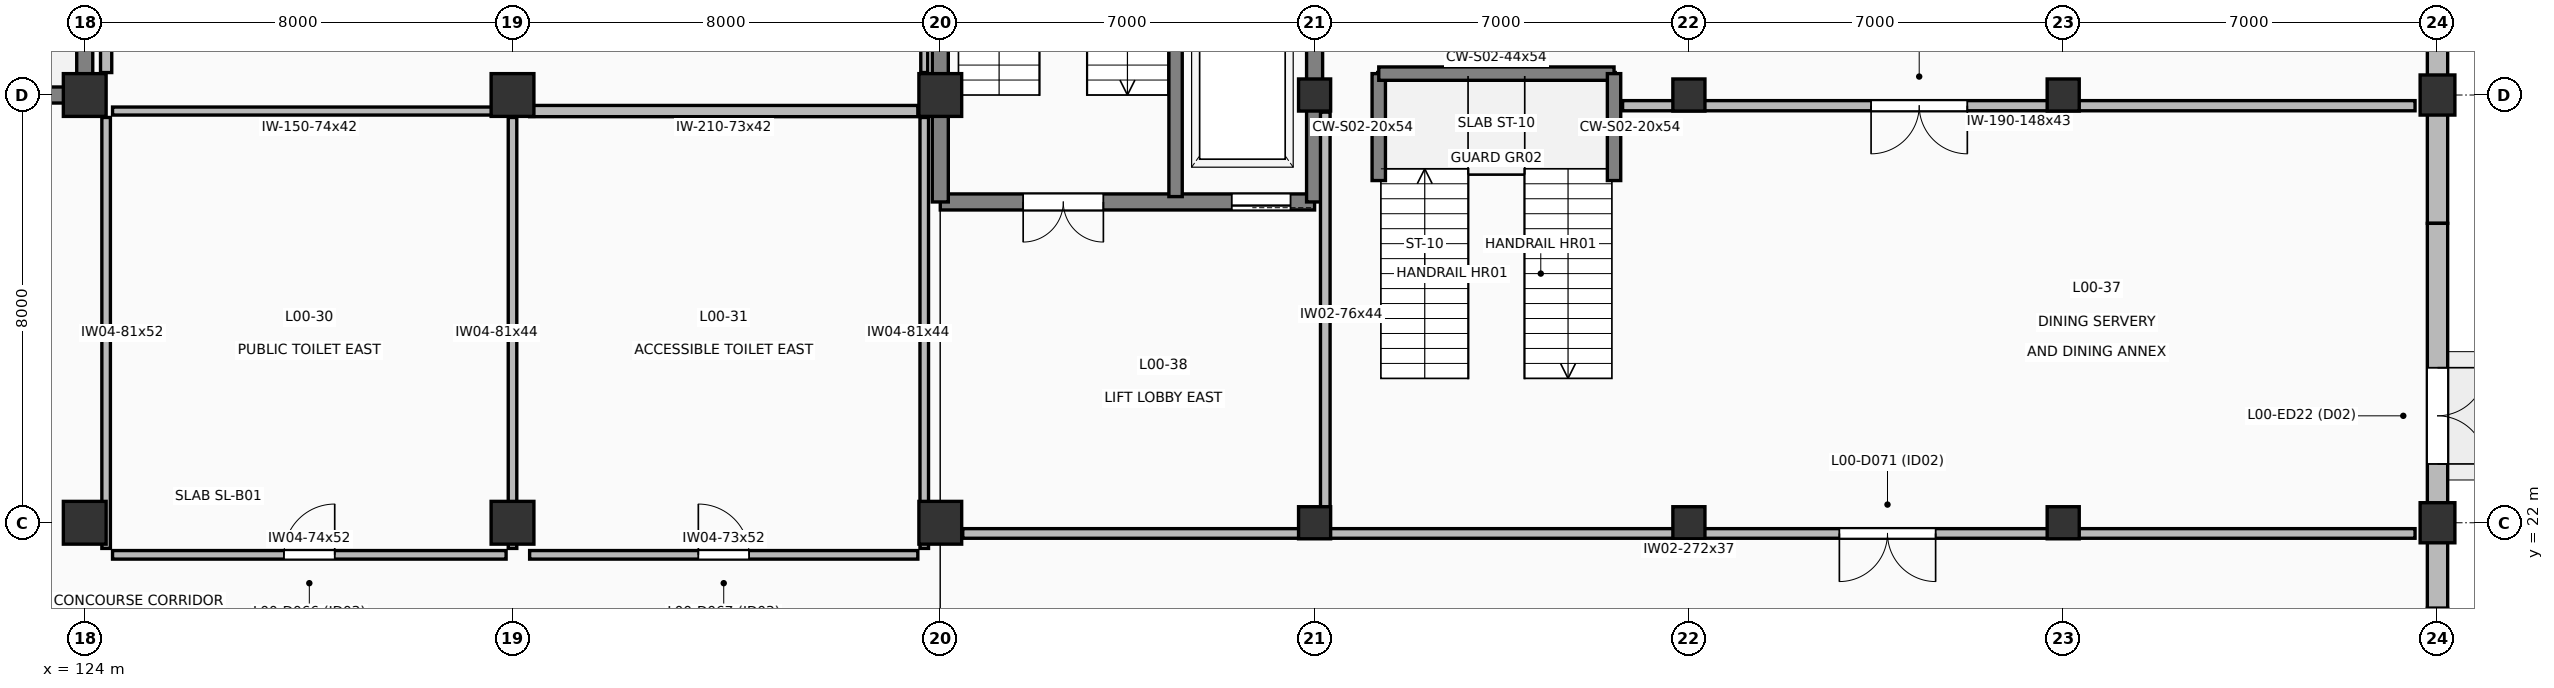
"""IFC4 building model, lengths in metres.
Left out: names, types, materials, properties, quantities, classifications, styles, units other than length and angle.
Written with IfcOpenShell. Run it as: python <this file> out.ifc"""

import sys

from ifc_helpers import new_model, si_unit, direction, frame, frame_2d, origin, origin_2d, place, context, subcontext, project, spatial, rectangle, extrude, element, fill, save


model = new_model("IFC4")
c1 = context("Model", 3, precision=1e-05, world=origin(), true_north=direction((0.0, 1.0)))
c2 = subcontext(c1, "Body", "Model", "MODEL_VIEW")
j1 = project(units=[si_unit("LENGTHUNIT", "METRE"), si_unit("PLANEANGLEUNIT", "RADIAN")], contexts=[c1])
p1 = place(None, origin())
s1 = spatial("IfcSite", under=j1, at=p1, CompositionType="ELEMENT")
p2 = place(p1, origin())
s2 = spatial("IfcBuilding", under=s1, at=p2, CompositionType="ELEMENT")
p3 = place(p2, origin())
s3 = spatial("IfcBuildingStorey", under=s2, at=p3, CompositionType="ELEMENT", Elevation=0.0)
for number, where, z_axis, x_axis in (
    (1, (124.0, 22.0, 0.0), (0.0, 0.0, 1.0), (1.0, 0.0, 0.0)),
    (2, (124.0, 30.0, 0.0), (0.0, 0.0, 1.0), (1.0, 0.0, 0.0)),
    (3, (132.0, 22.0, 0.0), (0.0, 0.0, 1.0), (1.0, 0.0, 0.0)),
    (4, (132.0, 30.0, 0.0), (0.0, 0.0, 1.0), (1.0, 0.0, 0.0)),
    (5, (140.0, 22.0, 0.0), (0.0, 0.0, 1.0), (1.0, 0.0, 0.0)),
    (6, (140.0, 30.0, 0.0), (0.0, 0.0, 1.0), (1.0, 0.0, 0.0)),
):
    element("IfcColumn", number, at=place(p3, frame(where, z_axis=z_axis, x_axis=x_axis)), inside=s3, PredefinedType="COLUMN", context=c2, shape_type="SweptSolid", body=[
        extrude(rectangle(XDim=0.8, YDim=0.8, at=origin_2d()), origin(), (0.0, 0.0, 1.0), 5.4),
    ])
for number, where, z_axis, x_axis in (
    (7, (147.0, 22.0, 0.0), (0.0, 0.0, 1.0), (1.0, 0.0, 0.0)),
    (8, (147.0, 30.0, 0.0), (0.0, 0.0, 1.0), (1.0, 0.0, 0.0)),
    (9, (154.0, 22.0, 0.0), (0.0, 0.0, 1.0), (1.0, 0.0, 0.0)),
    (10, (154.0, 30.0, 0.0), (0.0, 0.0, 1.0), (1.0, 0.0, 0.0)),
    (11, (161.0, 22.0, 0.0), (0.0, 0.0, 1.0), (1.0, 0.0, 0.0)),
    (12, (161.0, 30.0, 0.0), (0.0, 0.0, 1.0), (1.0, 0.0, 0.0)),
):
    element("IfcColumn", number, at=place(p3, frame(where, z_axis=z_axis, x_axis=x_axis)), inside=s3, PredefinedType="COLUMN", context=c2, shape_type="SweptSolid", body=[
        extrude(rectangle(XDim=0.6, YDim=0.6, at=origin_2d()), origin(), (0.0, 0.0, 1.0), 5.4),
    ])
for number, where, z_axis, x_axis in (
    (13, (168.0, 22.0, 0.0), (0.0, 0.0, 1.0), (1.0, 0.0, 0.0)),
    (14, (168.0, 30.0, 0.0), (0.0, 0.0, 1.0), (1.0, 0.0, 0.0)),
):
    element("IfcColumn", number, at=place(p3, frame(where, z_axis=z_axis, x_axis=x_axis)), inside=s3, PredefinedType="PILASTER", context=c2, shape_type="SweptSolid", body=[
        extrude(rectangle(XDim=0.65, YDim=0.75, at=origin_2d()), origin(), (0.0, 0.0, 1.0), 5.4),
    ])
p4 = place(p3, frame((168.0, 34.8, 0.0), z_axis=(0.0, 0.0, 1.0), x_axis=(0.0, -1.0, 0.0)))
e15 = element("IfcWall", 15, at=p4, inside=s3, PredefinedType="SOLIDWALL", context=c2, shape_type="SweptSolid", body=[
    extrude(rectangle(XDim=7.2, YDim=0.38, at=frame_2d((3.6, 0.0))), origin(), (0.0, 0.0, 1.0), 4.425),
])
p5 = place(p3, frame((168.0, 27.6, 0.0), z_axis=(0.0, 0.0, 1.0), x_axis=(0.0, -1.0, 0.0)))
e16 = element("IfcWall", 16, at=p5, inside=s3, PredefinedType="SOLIDWALL", context=c2, shape_type="SweptSolid", body=[
    extrude(rectangle(XDim=7.2, YDim=0.38, at=frame_2d((3.6, 0.0))), origin(), (0.0, 0.0, 1.0), 4.445),
])
p6 = place(p5, frame((2.7, 0.0, 0.0)))
e17 = element("IfcOpeningElement", 17, at=p6, cuts=e16, PredefinedType="OPENING", context=c2, shape_type="SweptSolid", body=[
    extrude(rectangle(XDim=1.8, YDim=2.3, at=frame_2d((0.9, 1.15))), frame((0.0, 0.2, 0.0), z_axis=(0.0, -1.0, 0.0), x_axis=(1.0, 0.0, 0.0)), (0.0, 0.0, 1.0), 0.4),
])
p7 = place(p3, frame((124.0, 30.0, 0.0), z_axis=(0.0, 0.0, 1.0), x_axis=(-1.0, 0.0, 0.0)))
e18 = element("IfcWall", 18, at=p7, inside=s3, PredefinedType="SHEAR", context=c2, shape_type="SweptSolid", body=[
    extrude(rectangle(XDim=8.0, YDim=0.3, at=frame_2d((4.0, 0.0))), origin(), (0.0, 0.0, 1.0), 5.4),
])
p8 = place(p7, frame((6.05, 0.0, 0.0)))
e19 = element("IfcOpeningElement", 19, at=p8, cuts=e18, PredefinedType="OPENING", context=c2, shape_type="SweptSolid", body=[
    extrude(rectangle(XDim=1.5, YDim=2.2, at=frame_2d((0.75, 1.1))), frame((0.0, 0.16, 0.0), z_axis=(0.0, -1.0, 0.0), x_axis=(1.0, 0.0, 0.0)), (0.0, 0.0, 1.0), 0.32),
])
p9 = place(p3, frame((124.0, 36.0, 0.0), z_axis=(0.0, 0.0, 1.0), x_axis=(0.0, -1.0, 0.0)))
e20 = element("IfcWall", 20, at=p9, inside=s3, PredefinedType="SHEAR", context=c2, shape_type="SweptSolid", body=[
    extrude(rectangle(XDim=6.0, YDim=0.3, at=frame_2d((3.0, 0.0))), origin(), (0.0, 0.0, 1.0), 5.4),
])
p10 = place(p3, frame((147.0, 28.0, 0.0), z_axis=(0.0, 0.0, 1.0), x_axis=(-1.0, 0.0, 0.0)))
e21 = element("IfcWall", 21, at=p10, inside=s3, PredefinedType="SHEAR", context=c2, shape_type="SweptSolid", body=[
    extrude(rectangle(XDim=7.0, YDim=0.3, at=frame_2d((3.5, 0.0))), origin(), (0.0, 0.0, 1.0), 5.4),
])
p11 = place(p10, frame((3.95, 0.0, 0.0)))
e22 = element("IfcOpeningElement", 22, at=p11, cuts=e21, PredefinedType="OPENING", context=c2, shape_type="SweptSolid", body=[
    extrude(rectangle(XDim=1.5, YDim=2.2, at=frame_2d((0.75, 1.1))), frame((0.0, 0.16, 0.0), z_axis=(0.0, -1.0, 0.0), x_axis=(1.0, 0.0, 0.0)), (0.0, 0.0, 1.0), 0.32),
])
p12 = place(p10, frame((0.45, 0.0, 0.0)))
e23 = element("IfcOpeningElement", 23, at=p12, cuts=e21, PredefinedType="OPENING", context=c2, shape_type="SweptSolid", body=[
    extrude(rectangle(XDim=1.1, YDim=2.2, at=frame_2d((0.55, 1.1))), frame((0.0, 0.16, 0.0), z_axis=(0.0, -1.0, 0.0), x_axis=(1.0, 0.0, 0.0)), (0.0, 0.0, 1.0), 0.32),
])
for number, where, z_axis, x_axis in (
    (24, (140.0, 28.0, 0.0), (0.0, 0.0, 1.0), (0.0, 1.0, 0.0)),
    (25, (147.0, 36.0, 0.0), (0.0, 0.0, 1.0), (0.0, -1.0, 0.0)),
):
    element("IfcWall", number, at=place(p3, frame(where, z_axis=z_axis, x_axis=x_axis)), inside=s3, PredefinedType="SHEAR", context=c2, shape_type="SweptSolid", body=[
        extrude(rectangle(XDim=8.0, YDim=0.3, at=frame_2d((4.0, 0.0))), origin(), (0.0, 0.0, 1.0), 5.4),
    ])
p13 = place(p3, frame((144.4, 28.1, 0.0), z_axis=(0.0, 0.0, 1.0), x_axis=(0.0, 1.0, 0.0)))
e26 = element("IfcWall", 26, at=p13, inside=s3, PredefinedType="SHEAR", context=c2, shape_type="SweptSolid", body=[
    extrude(rectangle(XDim=7.8, YDim=0.25, at=frame_2d((3.9, 0.0))), origin(), (0.0, 0.0, 1.0), 5.4),
])
p14 = place(p3, frame((148.2, 28.4, 0.0), z_axis=(0.0, 0.0, 1.0), x_axis=(0.0, 1.0, 0.0)))
e27 = element("IfcWall", 27, at=p14, inside=s3, PredefinedType="SHEAR", context=c2, shape_type="SweptSolid", body=[
    extrude(rectangle(XDim=2.0, YDim=0.25, at=frame_2d((1.0, 0.0))), origin(), (0.0, 0.0, 1.0), 5.4),
])
p15 = place(p3, frame((148.2, 30.4, 0.0), z_axis=(0.0, 0.0, 1.0), x_axis=(1.0, 0.0, 0.0)))
e28 = element("IfcWall", 28, at=p15, inside=s3, PredefinedType="SHEAR", context=c2, shape_type="SweptSolid", body=[
    extrude(rectangle(XDim=4.4, YDim=0.25, at=frame_2d((2.2, 0.0))), origin(), (0.0, 0.0, 1.0), 5.4),
])
p16 = place(p3, frame((152.6, 30.4, 0.0), z_axis=(0.0, 0.0, 1.0), x_axis=(0.0, -1.0, 0.0)))
e29 = element("IfcWall", 29, at=p16, inside=s3, PredefinedType="SHEAR", context=c2, shape_type="SweptSolid", body=[
    extrude(rectangle(XDim=2.0, YDim=0.25, at=frame_2d((1.0, 0.0))), origin(), (0.0, 0.0, 1.0), 5.4),
])
p17 = place(p3, frame((124.52, 21.4, 0.0), z_axis=(0.0, 0.0, 1.0), x_axis=(1.0, 0.0, 0.0)))
e30 = element("IfcWall", 30, at=p17, inside=s3, PredefinedType="PLUMBINGWALL", context=c2, shape_type="SweptSolid", body=[
    extrude(rectangle(XDim=7.36, YDim=0.16, at=frame_2d((3.68, 0.0))), origin(), (0.0, 0.0, 1.0), 5.16),
])
p18 = place(p17, frame((3.205, 0.0, 0.0)))
e31 = element("IfcOpeningElement", 31, at=p18, cuts=e30, PredefinedType="OPENING", context=c2, shape_type="SweptSolid", body=[
    extrude(rectangle(XDim=0.95, YDim=2.15, at=frame_2d((0.475, 1.075))), frame((0.0, 0.09, 0.0), z_axis=(0.0, -1.0, 0.0), x_axis=(1.0, 0.0, 0.0)), (0.0, 0.0, 1.0), 0.18),
])
p19 = place(p3, frame((124.4, 29.58, 0.0), z_axis=(0.0, 0.0, 1.0), x_axis=(0.0, -1.0, 0.0)))
e32 = element("IfcWall", 32, at=p19, inside=s3, PredefinedType="PLUMBINGWALL", context=c2, shape_type="SweptSolid", body=[
    extrude(rectangle(XDim=8.06, YDim=0.16, at=frame_2d((4.03, 0.0))), origin(), (0.0, 0.0, 1.0), 5.16),
])
p20 = place(p3, frame((132.0, 21.52, 0.0), z_axis=(0.0, 0.0, 1.0), x_axis=(0.0, 1.0, 0.0)))
e33 = element("IfcWall", 33, at=p20, inside=s3, PredefinedType="PLUMBINGWALL", context=c2, shape_type="SweptSolid", body=[
    extrude(rectangle(XDim=8.06, YDim=0.16, at=frame_2d((4.03, 0.0))), origin(), (0.0, 0.0, 1.0), 4.445),
])
p21 = place(p3, frame((131.88, 29.7, 0.0), z_axis=(0.0, 0.0, 1.0), x_axis=(-1.0, 0.0, 0.0)))
e34 = element("IfcWall", 34, at=p21, inside=s3, PredefinedType="PARTITIONING", context=c2, shape_type="SweptSolid", body=[
    extrude(rectangle(XDim=7.36, YDim=0.15, at=frame_2d((3.68, 0.0))), origin(), (0.0, 0.0, 1.0), 4.245),
])
p22 = place(p3, frame((132.32, 21.4, 0.0), z_axis=(0.0, 0.0, 1.0), x_axis=(1.0, 0.0, 0.0)))
e35 = element("IfcWall", 35, at=p22, inside=s3, PredefinedType="PLUMBINGWALL", context=c2, shape_type="SweptSolid", body=[
    extrude(rectangle(XDim=7.26, YDim=0.16, at=frame_2d((3.63, 0.0))), origin(), (0.0, 0.0, 1.0), 5.16),
])
p23 = place(p22, frame((3.155, 0.0, 0.0)))
e36 = element("IfcOpeningElement", 36, at=p23, cuts=e35, PredefinedType="OPENING", context=c2, shape_type="SweptSolid", body=[
    extrude(rectangle(XDim=0.95, YDim=2.15, at=frame_2d((0.475, 1.075))), frame((0.0, 0.09, 0.0), z_axis=(0.0, -1.0, 0.0), x_axis=(1.0, 0.0, 0.0)), (0.0, 0.0, 1.0), 0.18),
])
p24 = place(p3, frame((139.7, 21.52, 0.0), z_axis=(0.0, 0.0, 1.0), x_axis=(0.0, 1.0, 0.0)))
e37 = element("IfcWall", 37, at=p24, inside=s3, PredefinedType="PLUMBINGWALL", context=c2, shape_type="SweptSolid", body=[
    extrude(rectangle(XDim=8.06, YDim=0.16, at=frame_2d((4.03, 0.0))), origin(), (0.0, 0.0, 1.0), 4.445),
])
p25 = place(p3, frame((139.58, 29.7, 0.0), z_axis=(0.0, 0.0, 1.0), x_axis=(-1.0, 0.0, 0.0)))
e38 = element("IfcWall", 38, at=p25, inside=s3, PredefinedType="PARTITIONING", context=c2, shape_type="SweptSolid", body=[
    extrude(rectangle(XDim=7.26, YDim=0.21, at=frame_2d((3.63, 0.0))), origin(), (0.0, 0.0, 1.0), 4.245),
])
p26 = place(p3, frame((124.4, 44.68, 0.0), z_axis=(0.0, 0.0, 1.0), x_axis=(0.0, -1.0, 0.0)))
e39 = element("IfcWall", 39, at=p26, inside=s3, PredefinedType="PARTITIONING", context=c2, shape_type="SweptSolid", body=[
    extrude(rectangle(XDim=14.26, YDim=0.21, at=frame_2d((7.13, 0.0))), origin(), (0.0, 0.0, 1.0), 5.16),
])
p27 = place(p3, frame((139.7, 30.42, 0.0), z_axis=(0.0, 0.0, 1.0), x_axis=(0.0, 1.0, 0.0)))
e40 = element("IfcWall", 40, at=p27, inside=s3, PredefinedType="PARTITIONING", context=c2, shape_type="SweptSolid", body=[
    extrude(rectangle(XDim=14.26, YDim=0.13, at=frame_2d((7.13, 0.0))), origin(), (0.0, 0.0, 1.0), 4.425),
])
p28 = place(p3, frame((167.58, 21.8, 0.0), z_axis=(0.0, 0.0, 1.0), x_axis=(-1.0, 0.0, 0.0)))
e41 = element("IfcWall", 41, at=p28, inside=s3, PredefinedType="PARTITIONING", context=c2, shape_type="SweptSolid", body=[
    extrude(rectangle(XDim=27.16, YDim=0.18, at=frame_2d((13.58, 0.0))), origin(), (0.0, 0.0, 1.0), 3.745),
])
p29 = place(p28, frame((8.966, 0.0, 0.0)))
e42 = element("IfcOpeningElement", 42, at=p29, cuts=e41, PredefinedType="OPENING", context=c2, shape_type="SweptSolid", body=[
    extrude(rectangle(XDim=1.8, YDim=2.3, at=frame_2d((0.9, 1.15))), frame((0.0, 0.1, 0.0), z_axis=(0.0, -1.0, 0.0), x_axis=(1.0, 0.0, 0.0)), (0.0, 0.0, 1.0), 0.2),
])
p30 = place(p3, frame((167.58, 29.8, 0.0), z_axis=(0.0, 0.0, 1.0), x_axis=(-1.0, 0.0, 0.0)))
e43 = element("IfcWall", 43, at=p30, inside=s3, PredefinedType="PARTITIONING", context=c2, shape_type="SweptSolid", body=[
    extrude(rectangle(XDim=14.82, YDim=0.19, at=frame_2d((7.41, 0.0))), origin(), (0.0, 0.0, 1.0), 4.315),
])
p31 = place(p30, frame((8.373, 0.0, 0.0)))
e44 = element("IfcOpeningElement", 44, at=p31, cuts=e43, PredefinedType="OPENING", context=c2, shape_type="SweptSolid", body=[
    extrude(rectangle(XDim=1.8, YDim=2.3, at=frame_2d((0.9, 1.15))), frame((0.0, 0.105, 0.0), z_axis=(0.0, -1.0, 0.0), x_axis=(1.0, 0.0, 0.0)), (0.0, 0.0, 1.0), 0.21),
])
p32 = place(p3, frame((147.2, 29.68, 0.0), z_axis=(0.0, 0.0, 1.0), x_axis=(0.0, -1.0, 0.0)))
e45 = element("IfcWall", 45, at=p32, inside=s3, PredefinedType="PARTITIONING", context=c2, shape_type="SweptSolid", body=[
    extrude(rectangle(XDim=7.56, YDim=0.18, at=frame_2d((3.78, 0.0))), origin(), (0.0, 0.0, 1.0), 4.445),
])
p33 = place(p3, frame((150.6, 41.58, 0.0), z_axis=(0.0, 0.0, 1.0), x_axis=(0.0, -1.0, 0.0)))
e46 = element("IfcWall", 46, at=p33, inside=s3, PredefinedType="SOLIDWALL", context=c2, shape_type="SweptSolid", body=[
    extrude(rectangle(XDim=11.02, YDim=0.22, at=frame_2d((5.51, 0.0))), origin(), (0.0, 0.0, 1.0), 5.16),
])
p34 = place(p33, frame((4.985, 0.0, 0.0)))
e47 = element("IfcOpeningElement", 47, at=p34, cuts=e46, PredefinedType="OPENING", context=c2, shape_type="SweptSolid", body=[
    extrude(rectangle(XDim=1.05, YDim=2.2, at=frame_2d((0.525, 1.1))), frame((0.0, 0.12, 0.0), z_axis=(0.0, -1.0, 0.0), x_axis=(1.0, 0.0, 0.0)), (0.0, 0.0, 1.0), 0.24),
])
p35 = place(p6, origin())
e48 = element("IfcDoor", 48, at=p35, inside=s3, OperationType="DOUBLE_DOOR_SINGLE_SWING", PredefinedType="DOOR", context=c2, shape_type="SweptSolid", body=[
    extrude(rectangle(XDim=1.8, YDim=2.3, at=frame_2d((0.9, 1.15))), frame((0.0, 0.025, 0.0), z_axis=(0.0, -1.0, 0.0), x_axis=(1.0, 0.0, 0.0)), (0.0, 0.0, 1.0), 0.05),
])
fill(e17, e48)
p36 = place(p11, origin())
e49 = element("IfcDoor", 49, at=p36, inside=s3, OperationType="DOUBLE_DOOR_SINGLE_SWING", PredefinedType="DOOR", context=c2, shape_type="SweptSolid", body=[
    extrude(rectangle(XDim=1.5, YDim=2.2, at=frame_2d((0.75, 1.1))), frame((0.0, 0.025, 0.0), z_axis=(0.0, -1.0, 0.0), x_axis=(1.0, 0.0, 0.0)), (0.0, 0.0, 1.0), 0.05),
])
fill(e22, e49)
p37 = place(p12, origin())
e50 = element("IfcDoor", 50, at=p37, inside=s3, OperationType="SLIDING_TO_LEFT", PredefinedType="DOOR", context=c2, shape_type="SweptSolid", body=[
    extrude(rectangle(XDim=1.1, YDim=2.2, at=frame_2d((0.55, 1.1))), frame((0.0, 0.025, 0.0), z_axis=(0.0, -1.0, 0.0), x_axis=(1.0, 0.0, 0.0)), (0.0, 0.0, 1.0), 0.05),
])
fill(e23, e50)
p38 = place(p18, origin())
e51 = element("IfcDoor", 51, at=p38, inside=s3, OperationType="SINGLE_SWING_RIGHT", PredefinedType="DOOR", context=c2, shape_type="SweptSolid", body=[
    extrude(rectangle(XDim=0.95, YDim=2.15, at=frame_2d((0.475, 1.075))), frame((0.0, 0.025, 0.0), z_axis=(0.0, -1.0, 0.0), x_axis=(1.0, 0.0, 0.0)), (0.0, 0.0, 1.0), 0.05),
])
fill(e31, e51)
p39 = place(p23, origin())
e52 = element("IfcDoor", 52, at=p39, inside=s3, OperationType="SINGLE_SWING_LEFT", PredefinedType="DOOR", context=c2, shape_type="SweptSolid", body=[
    extrude(rectangle(XDim=0.95, YDim=2.15, at=frame_2d((0.475, 1.075))), frame((0.0, 0.025, 0.0), z_axis=(0.0, -1.0, 0.0), x_axis=(1.0, 0.0, 0.0)), (0.0, 0.0, 1.0), 0.05),
])
fill(e36, e52)
p40 = place(p29, origin())
e53 = element("IfcDoor", 53, at=p40, inside=s3, OperationType="DOUBLE_DOOR_SINGLE_SWING", PredefinedType="DOOR", context=c2, shape_type="SweptSolid", body=[
    extrude(rectangle(XDim=1.8, YDim=2.3, at=frame_2d((0.9, 1.15))), frame((0.0, 0.025, 0.0), z_axis=(0.0, -1.0, 0.0), x_axis=(1.0, 0.0, 0.0)), (0.0, 0.0, 1.0), 0.05),
])
fill(e42, e53)
p41 = place(p31, origin())
e54 = element("IfcDoor", 54, at=p41, inside=s3, OperationType="DOUBLE_DOOR_SINGLE_SWING", PredefinedType="DOOR", context=c2, shape_type="SweptSolid", body=[
    extrude(rectangle(XDim=1.8, YDim=2.3, at=frame_2d((0.9, 1.15))), frame((0.0, 0.025, 0.0), z_axis=(0.0, -1.0, 0.0), x_axis=(1.0, 0.0, 0.0)), (0.0, 0.0, 1.0), 0.05),
])
fill(e44, e54)
save(model, sys.argv[1])
